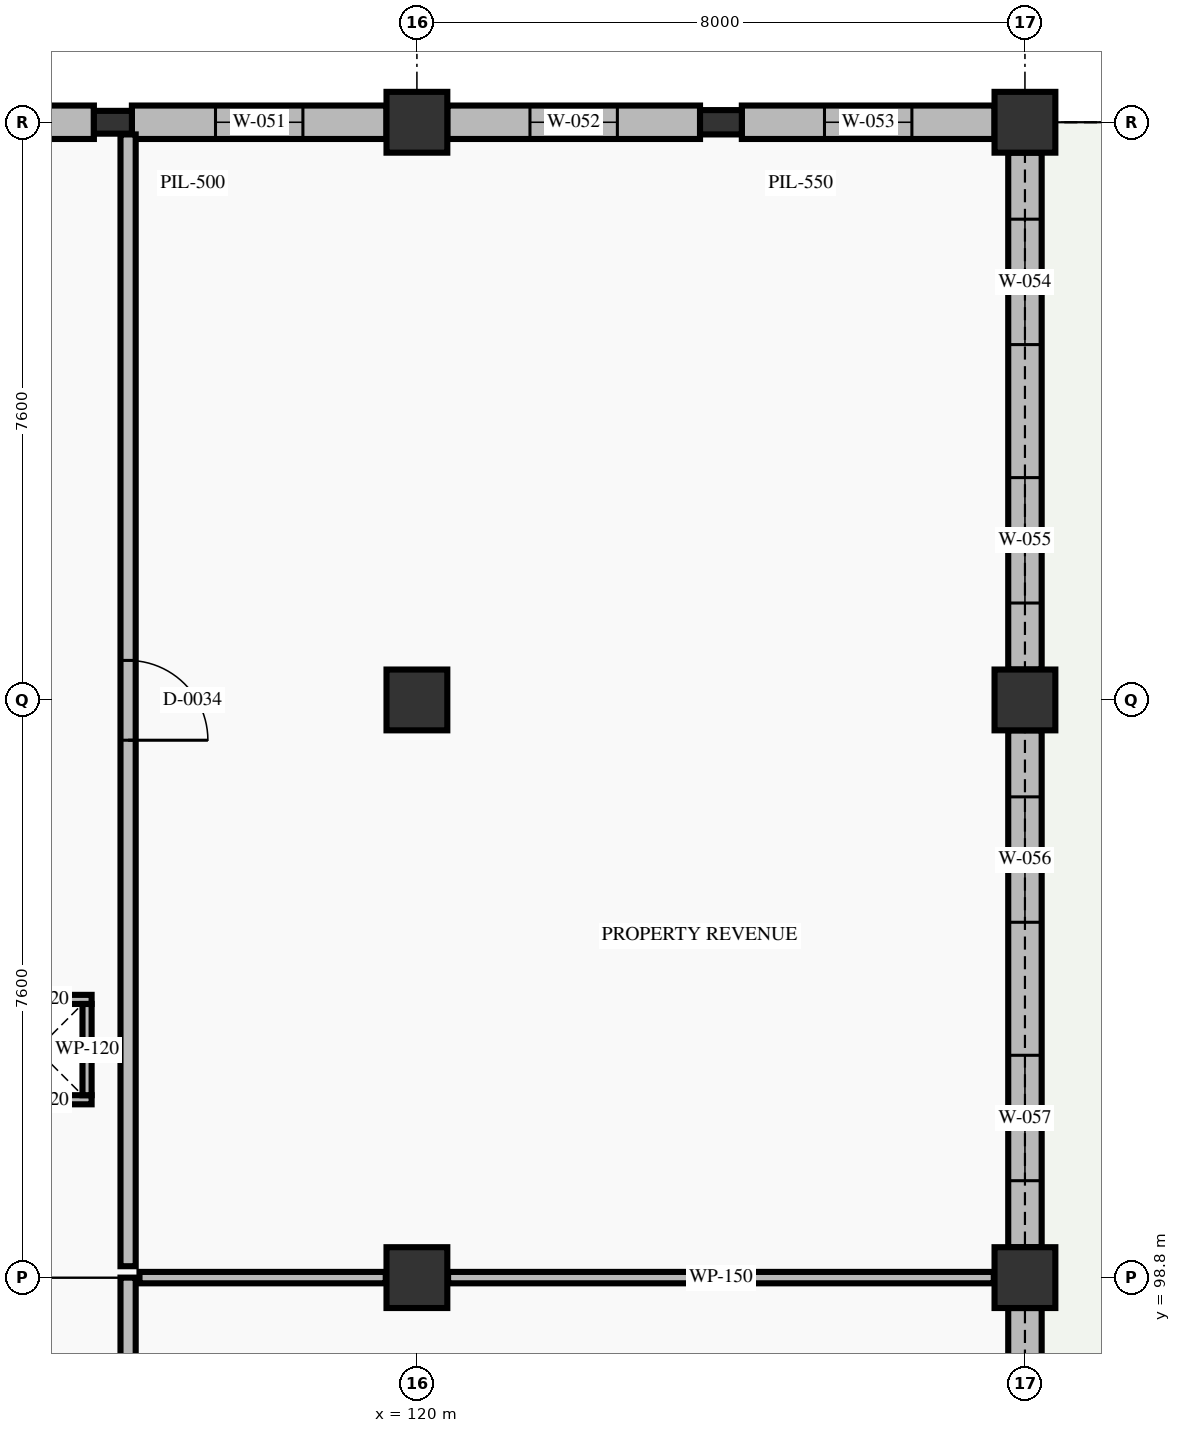
"""IFC4 building model, lengths in metres.
Left out: names, types, materials, properties, quantities, classifications, styles, units other than length and angle.
Written with IfcOpenShell. Run it as: python <this file> out.ifc"""

import sys

from ifc_helpers import new_model, si_unit, direction, frame, frame_2d, origin, origin_2d, place, context, subcontext, project, spatial, rectangle, extrude, element, fill, save


model = new_model("IFC4")
c1 = context("Model", 3, precision=1e-05, world=origin(), true_north=direction((0.0, 1.0)))
c2 = subcontext(c1, "Body", "Model", "MODEL_VIEW")
j1 = project(units=[si_unit("LENGTHUNIT", "METRE"), si_unit("PLANEANGLEUNIT", "RADIAN")], contexts=[c1])
p1 = place(None, origin())
s1 = spatial("IfcSite", under=j1, at=p1, CompositionType="ELEMENT")
p2 = place(p1, origin())
s2 = spatial("IfcBuilding", under=s1, at=p2, CompositionType="ELEMENT")
p3 = place(p2, origin())
s3 = spatial("IfcBuildingStorey", under=s2, at=p3, CompositionType="ELEMENT", Elevation=0.0)
for number, where, z_axis, x_axis in (
    (1, (120.0, 98.8, 0.0), (0.0, 0.0, 1.0), (1.0, 0.0, 0.0)),
    (2, (120.0, 106.4, 0.0), (0.0, 0.0, 1.0), (1.0, 0.0, 0.0)),
    (3, (120.0, 114.0, 0.0), (0.0, 0.0, 1.0), (1.0, 0.0, 0.0)),
    (4, (128.0, 98.8, 0.0), (0.0, 0.0, 1.0), (1.0, 0.0, 0.0)),
    (5, (128.0, 106.4, 0.0), (0.0, 0.0, 1.0), (1.0, 0.0, 0.0)),
    (6, (128.0, 114.0, 0.0), (0.0, 0.0, 1.0), (1.0, 0.0, 0.0)),
):
    element("IfcColumn", number, at=place(p3, frame(where, z_axis=z_axis, x_axis=x_axis)), inside=s3, PredefinedType="COLUMN", context=c2, shape_type="SweptSolid", body=[
        extrude(rectangle(XDim=0.8, YDim=0.8, at=origin_2d()), origin(), (0.0, 0.0, 1.0), 5.4),
    ])
p4 = place(p3, frame((116.0, 114.0, 0.0), z_axis=(0.0, 0.0, 1.0), x_axis=(1.0, 0.0, 0.0)))
e7 = element("IfcColumn", 7, at=p4, inside=s3, PredefinedType="PILASTER", context=c2, shape_type="SweptSolid", body=[
    extrude(rectangle(XDim=0.5, YDim=0.3, at=origin_2d()), origin(), (0.0, 0.0, 1.0), 5.4),
])
p5 = place(p3, frame((124.0, 114.0, 0.0), z_axis=(0.0, 0.0, 1.0), x_axis=(1.0, 0.0, 0.0)))
e8 = element("IfcColumn", 8, at=p5, inside=s3, PredefinedType="PILASTER", context=c2, shape_type="SweptSolid", body=[
    extrude(rectangle(XDim=0.55, YDim=0.32, at=origin_2d()), origin(), (0.0, 0.0, 1.0), 5.4),
])
p6 = place(p3, frame((112.4, 114.0, 0.0), z_axis=(0.0, 0.0, 1.0), x_axis=(1.0, 0.0, 0.0)))
e9 = element("IfcWall", 9, at=p6, inside=s3, PredefinedType="STANDARD", context=c2, shape_type="SweptSolid", body=[
    extrude(rectangle(XDim=3.35, YDim=0.44, at=frame_2d((1.675, 0.0))), origin(), (0.0, 0.0, 1.0), 4.56),
])
p7 = place(p6, frame((0.755, 0.0, 0.0)))
e10 = element("IfcOpeningElement", 10, at=p7, cuts=e9, PredefinedType="OPENING", context=c2, shape_type="SweptSolid", body=[
    extrude(rectangle(XDim=1.84, YDim=2.32, at=frame_2d((0.92, 1.16))), frame((0.0, 0.23, 0.0), z_axis=(0.0, -1.0, 0.0), x_axis=(1.0, 0.0, 0.0)), (0.0, 0.0, 1.0), 0.46),
])
p8 = place(p3, frame((116.25, 114.0, 0.0), z_axis=(0.0, 0.0, 1.0), x_axis=(1.0, 0.0, 0.0)))
e11 = element("IfcWall", 11, at=p8, inside=s3, PredefinedType="STANDARD", context=c2, shape_type="SweptSolid", body=[
    extrude(rectangle(XDim=3.35, YDim=0.44, at=frame_2d((1.675, 0.0))), origin(), (0.0, 0.0, 1.0), 4.56),
])
p9 = place(p8, frame((1.1, 0.0, 1.05)))
e12 = element("IfcOpeningElement", 12, at=p9, cuts=e11, PredefinedType="OPENING", context=c2, shape_type="SweptSolid", body=[
    extrude(rectangle(XDim=1.15, YDim=1.65, at=frame_2d((0.575, 0.825))), frame((0.0, 0.23, 0.0), z_axis=(0.0, -1.0, 0.0), x_axis=(1.0, 0.0, 0.0)), (0.0, 0.0, 1.0), 0.46),
])
p10 = place(p3, frame((120.4, 114.0, 0.0), z_axis=(0.0, 0.0, 1.0), x_axis=(1.0, 0.0, 0.0)))
e13 = element("IfcWall", 13, at=p10, inside=s3, PredefinedType="STANDARD", context=c2, shape_type="SweptSolid", body=[
    extrude(rectangle(XDim=3.325, YDim=0.44, at=frame_2d((1.663, 0.0))), origin(), (0.0, 0.0, 1.0), 4.56),
])
p11 = place(p10, frame((1.087, 0.0, 1.05)))
e14 = element("IfcOpeningElement", 14, at=p11, cuts=e13, PredefinedType="OPENING", context=c2, shape_type="SweptSolid", body=[
    extrude(rectangle(XDim=1.15, YDim=1.65, at=frame_2d((0.575, 0.825))), frame((0.0, 0.23, 0.0), z_axis=(0.0, -1.0, 0.0), x_axis=(1.0, 0.0, 0.0)), (0.0, 0.0, 1.0), 0.46),
])
p12 = place(p3, frame((124.275, 114.0, 0.0), z_axis=(0.0, 0.0, 1.0), x_axis=(1.0, 0.0, 0.0)))
e15 = element("IfcWall", 15, at=p12, inside=s3, PredefinedType="STANDARD", context=c2, shape_type="SweptSolid", body=[
    extrude(rectangle(XDim=3.325, YDim=0.44, at=frame_2d((1.663, 0.0))), origin(), (0.0, 0.0, 1.0), 4.56),
])
p13 = place(p12, frame((1.087, 0.0, 1.05)))
e16 = element("IfcOpeningElement", 16, at=p13, cuts=e15, PredefinedType="OPENING", context=c2, shape_type="SweptSolid", body=[
    extrude(rectangle(XDim=1.15, YDim=1.65, at=frame_2d((0.575, 0.825))), frame((0.0, 0.23, 0.0), z_axis=(0.0, -1.0, 0.0), x_axis=(1.0, 0.0, 0.0)), (0.0, 0.0, 1.0), 0.46),
])
p14 = place(p3, frame((128.0, 113.6, 0.0), z_axis=(0.0, 0.0, 1.0), x_axis=(0.0, -1.0, 0.0)))
e17 = element("IfcWall", 17, at=p14, inside=s3, PredefinedType="STANDARD", context=c2, shape_type="SweptSolid", body=[
    extrude(rectangle(XDim=6.8, YDim=0.44, at=frame_2d((3.4, 0.0))), origin(), (0.0, 0.0, 1.0), 4.46),
])
p15 = place(p14, frame((0.875, 0.0, 0.9)))
e18 = element("IfcOpeningElement", 18, at=p15, cuts=e17, PredefinedType="OPENING", context=c2, shape_type="SweptSolid", body=[
    extrude(rectangle(XDim=1.65, YDim=2.6, at=frame_2d((0.825, 1.3))), frame((0.0, 0.23, 0.0), z_axis=(0.0, -1.0, 0.0), x_axis=(1.0, 0.0, 0.0)), (0.0, 0.0, 1.0), 0.46),
])
p16 = place(p14, frame((4.275, 0.0, 0.9)))
e19 = element("IfcOpeningElement", 19, at=p16, cuts=e17, PredefinedType="OPENING", context=c2, shape_type="SweptSolid", body=[
    extrude(rectangle(XDim=1.65, YDim=2.6, at=frame_2d((0.825, 1.3))), frame((0.0, 0.23, 0.0), z_axis=(0.0, -1.0, 0.0), x_axis=(1.0, 0.0, 0.0)), (0.0, 0.0, 1.0), 0.46),
])
p17 = place(p3, frame((128.0, 106.0, 0.0), z_axis=(0.0, 0.0, 1.0), x_axis=(0.0, -1.0, 0.0)))
e20 = element("IfcWall", 20, at=p17, inside=s3, PredefinedType="STANDARD", context=c2, shape_type="SweptSolid", body=[
    extrude(rectangle(XDim=6.8, YDim=0.44, at=frame_2d((3.4, 0.0))), origin(), (0.0, 0.0, 1.0), 4.46),
])
p18 = place(p17, frame((0.875, 0.0, 0.9)))
e21 = element("IfcOpeningElement", 21, at=p18, cuts=e20, PredefinedType="OPENING", context=c2, shape_type="SweptSolid", body=[
    extrude(rectangle(XDim=1.65, YDim=2.6, at=frame_2d((0.825, 1.3))), frame((0.0, 0.23, 0.0), z_axis=(0.0, -1.0, 0.0), x_axis=(1.0, 0.0, 0.0)), (0.0, 0.0, 1.0), 0.46),
])
p19 = place(p17, frame((4.275, 0.0, 0.9)))
e22 = element("IfcOpeningElement", 22, at=p19, cuts=e20, PredefinedType="OPENING", context=c2, shape_type="SweptSolid", body=[
    extrude(rectangle(XDim=1.65, YDim=2.6, at=frame_2d((0.825, 1.3))), frame((0.0, 0.23, 0.0), z_axis=(0.0, -1.0, 0.0), x_axis=(1.0, 0.0, 0.0)), (0.0, 0.0, 1.0), 0.46),
])
p20 = place(p3, frame((128.0, 98.4, 0.0), z_axis=(0.0, 0.0, 1.0), x_axis=(0.0, -1.0, 0.0)))
e23 = element("IfcWall", 23, at=p20, inside=s3, PredefinedType="STANDARD", context=c2, shape_type="SweptSolid", body=[
    extrude(rectangle(XDim=6.8, YDim=0.44, at=frame_2d((3.4, 0.0))), origin(), (0.0, 0.0, 1.0), 4.46),
])
p21 = place(p20, frame((0.875, 0.0, 0.9)))
e24 = element("IfcOpeningElement", 24, at=p21, cuts=e23, PredefinedType="OPENING", context=c2, shape_type="SweptSolid", body=[
    extrude(rectangle(XDim=1.65, YDim=2.6, at=frame_2d((0.825, 1.3))), frame((0.0, 0.23, 0.0), z_axis=(0.0, -1.0, 0.0), x_axis=(1.0, 0.0, 0.0)), (0.0, 0.0, 1.0), 0.46),
])
p22 = place(p20, frame((4.275, 0.0, 0.9)))
e25 = element("IfcOpeningElement", 25, at=p22, cuts=e23, PredefinedType="OPENING", context=c2, shape_type="SweptSolid", body=[
    extrude(rectangle(XDim=1.65, YDim=2.6, at=frame_2d((0.825, 1.3))), frame((0.0, 0.23, 0.0), z_axis=(0.0, -1.0, 0.0), x_axis=(1.0, 0.0, 0.0)), (0.0, 0.0, 1.0), 0.46),
])
for number, where, z_axis, x_axis in (
    (26, (115.72, 101.14, 0.0), (0.0, 0.0, 1.0), (-1.0, 0.0, 0.0)),
    (27, (114.28, 102.46, 0.0), (0.0, 0.0, 1.0), (1.0, 0.0, 0.0)),
):
    element("IfcWall", number, at=place(p3, frame(where, z_axis=z_axis, x_axis=x_axis)), inside=s3, PredefinedType="PARTITIONING", context=c2, shape_type="SweptSolid", body=[
        extrude(rectangle(XDim=1.44, YDim=0.12, at=frame_2d((0.72, 0.0))), origin(), (0.0, 0.0, 1.0), 5.16),
    ])
p23 = place(p3, frame((115.66, 102.4, 0.0), z_axis=(0.0, 0.0, 1.0), x_axis=(0.0, -1.0, 0.0)))
e28 = element("IfcWall", 28, at=p23, inside=s3, PredefinedType="PARTITIONING", context=c2, shape_type="SweptSolid", body=[
    extrude(rectangle(XDim=1.2, YDim=0.12, at=frame_2d((0.6, 0.0))), origin(), (0.0, 0.0, 1.0), 5.16),
])
p24 = place(p3, frame((116.2, 98.8, 0.0), z_axis=(0.0, 0.0, 1.0), x_axis=(0.0, -1.0, 0.0)))
e29 = element("IfcWall", 29, at=p24, inside=s3, PredefinedType="STANDARD", context=c2, shape_type="SweptSolid", body=[
    extrude(rectangle(XDim=15.0, YDim=0.2, at=frame_2d((7.5, 0.0))), origin(), (0.0, 0.0, 1.0), 4.66),
])
p25 = place(p24, frame((6.975, 0.0, 0.0)))
e30 = element("IfcOpeningElement", 30, at=p25, cuts=e29, PredefinedType="OPENING", context=c2, shape_type="SweptSolid", body=[
    extrude(rectangle(XDim=1.05, YDim=2.15, at=frame_2d((0.525, 1.075))), frame((0.0, 0.11, 0.0), z_axis=(0.0, -1.0, 0.0), x_axis=(1.0, 0.0, 0.0)), (0.0, 0.0, 1.0), 0.22),
])
p26 = place(p24, frame((8.475, 0.0, 0.0)))
e31 = element("IfcOpeningElement", 31, at=p26, cuts=e29, PredefinedType="OPENING", context=c2, shape_type="SweptSolid", body=[
    extrude(rectangle(XDim=1.05, YDim=2.15, at=frame_2d((0.525, 1.075))), frame((0.0, 0.11, 0.0), z_axis=(0.0, -1.0, 0.0), x_axis=(1.0, 0.0, 0.0)), (0.0, 0.0, 1.0), 0.22),
])
p27 = place(p3, frame((116.2, 113.84, 0.0), z_axis=(0.0, 0.0, 1.0), x_axis=(0.0, -1.0, 0.0)))
e32 = element("IfcWall", 32, at=p27, inside=s3, PredefinedType="STANDARD", context=c2, shape_type="SweptSolid", body=[
    extrude(rectangle(XDim=14.89, YDim=0.2, at=frame_2d((7.445, 0.0))), origin(), (0.0, 0.0, 1.0), 4.66),
])
p28 = place(p27, frame((6.92, 0.0, 0.0)))
e33 = element("IfcOpeningElement", 33, at=p28, cuts=e32, PredefinedType="OPENING", context=c2, shape_type="SweptSolid", body=[
    extrude(rectangle(XDim=1.05, YDim=2.15, at=frame_2d((0.525, 1.075))), frame((0.0, 0.11, 0.0), z_axis=(0.0, -1.0, 0.0), x_axis=(1.0, 0.0, 0.0)), (0.0, 0.0, 1.0), 0.22),
])
p29 = place(p3, frame((116.35, 98.8, 0.0), z_axis=(0.0, 0.0, 1.0), x_axis=(1.0, 0.0, 0.0)))
e34 = element("IfcWall", 34, at=p29, inside=s3, PredefinedType="PARTITIONING", context=c2, shape_type="SweptSolid", body=[
    extrude(rectangle(XDim=3.24, YDim=0.15, at=frame_2d((1.62, 0.0))), origin(), (0.0, 0.0, 1.0), 4.56),
])
p30 = place(p3, frame((120.41, 98.8, 0.0), z_axis=(0.0, 0.0, 1.0), x_axis=(1.0, 0.0, 0.0)))
e35 = element("IfcWall", 35, at=p30, inside=s3, PredefinedType="PARTITIONING", context=c2, shape_type="SweptSolid", body=[
    extrude(rectangle(XDim=7.18, YDim=0.15, at=frame_2d((3.59, 0.0))), origin(), (0.0, 0.0, 1.0), 4.56),
])
p31 = place(p9, origin())
e36 = element("IfcWindow", 36, at=p31, inside=s3, PartitioningType="SINGLE_PANEL", PredefinedType="WINDOW", context=c2, shape_type="SweptSolid", body=[
    extrude(rectangle(XDim=1.15, YDim=1.65, at=frame_2d((0.575, 0.825))), frame((0.0, 0.03, 0.0), z_axis=(0.0, -1.0, 0.0), x_axis=(1.0, 0.0, 0.0)), (0.0, 0.0, 1.0), 0.06),
])
fill(e12, e36)
p32 = place(p11, origin())
e37 = element("IfcWindow", 37, at=p32, inside=s3, PartitioningType="SINGLE_PANEL", PredefinedType="WINDOW", context=c2, shape_type="SweptSolid", body=[
    extrude(rectangle(XDim=1.15, YDim=1.65, at=frame_2d((0.575, 0.825))), frame((0.0, 0.03, 0.0), z_axis=(0.0, -1.0, 0.0), x_axis=(1.0, 0.0, 0.0)), (0.0, 0.0, 1.0), 0.06),
])
fill(e14, e37)
p33 = place(p13, origin())
e38 = element("IfcWindow", 38, at=p33, inside=s3, PartitioningType="SINGLE_PANEL", PredefinedType="WINDOW", context=c2, shape_type="SweptSolid", body=[
    extrude(rectangle(XDim=1.15, YDim=1.65, at=frame_2d((0.575, 0.825))), frame((0.0, 0.03, 0.0), z_axis=(0.0, -1.0, 0.0), x_axis=(1.0, 0.0, 0.0)), (0.0, 0.0, 1.0), 0.06),
])
fill(e16, e38)
p34 = place(p15, origin())
e39 = element("IfcWindow", 39, at=p34, inside=s3, PartitioningType="DOUBLE_PANEL_VERTICAL", PredefinedType="WINDOW", context=c2, shape_type="SweptSolid", body=[
    extrude(rectangle(XDim=1.65, YDim=2.6, at=frame_2d((0.825, 1.3))), frame((0.0, 0.03, 0.0), z_axis=(0.0, -1.0, 0.0), x_axis=(1.0, 0.0, 0.0)), (0.0, 0.0, 1.0), 0.06),
])
fill(e18, e39)
p35 = place(p16, origin())
e40 = element("IfcWindow", 40, at=p35, inside=s3, PartitioningType="DOUBLE_PANEL_VERTICAL", PredefinedType="WINDOW", context=c2, shape_type="SweptSolid", body=[
    extrude(rectangle(XDim=1.65, YDim=2.6, at=frame_2d((0.825, 1.3))), frame((0.0, 0.03, 0.0), z_axis=(0.0, -1.0, 0.0), x_axis=(1.0, 0.0, 0.0)), (0.0, 0.0, 1.0), 0.06),
])
fill(e19, e40)
p36 = place(p18, origin())
e41 = element("IfcWindow", 41, at=p36, inside=s3, PartitioningType="DOUBLE_PANEL_VERTICAL", PredefinedType="WINDOW", context=c2, shape_type="SweptSolid", body=[
    extrude(rectangle(XDim=1.65, YDim=2.6, at=frame_2d((0.825, 1.3))), frame((0.0, 0.03, 0.0), z_axis=(0.0, -1.0, 0.0), x_axis=(1.0, 0.0, 0.0)), (0.0, 0.0, 1.0), 0.06),
])
fill(e21, e41)
p37 = place(p19, origin())
e42 = element("IfcWindow", 42, at=p37, inside=s3, PartitioningType="DOUBLE_PANEL_VERTICAL", PredefinedType="WINDOW", context=c2, shape_type="SweptSolid", body=[
    extrude(rectangle(XDim=1.65, YDim=2.6, at=frame_2d((0.825, 1.3))), frame((0.0, 0.03, 0.0), z_axis=(0.0, -1.0, 0.0), x_axis=(1.0, 0.0, 0.0)), (0.0, 0.0, 1.0), 0.06),
])
fill(e22, e42)
p38 = place(p28, origin())
e43 = element("IfcDoor", 43, at=p38, inside=s3, OperationType="SINGLE_SWING_RIGHT", PredefinedType="DOOR", context=c2, shape_type="SweptSolid", body=[
    extrude(rectangle(XDim=1.05, YDim=2.15, at=frame_2d((0.525, 1.075))), frame((0.0, 0.025, 0.0), z_axis=(0.0, -1.0, 0.0), x_axis=(1.0, 0.0, 0.0)), (0.0, 0.0, 1.0), 0.05),
])
fill(e33, e43)
save(model, sys.argv[1])
